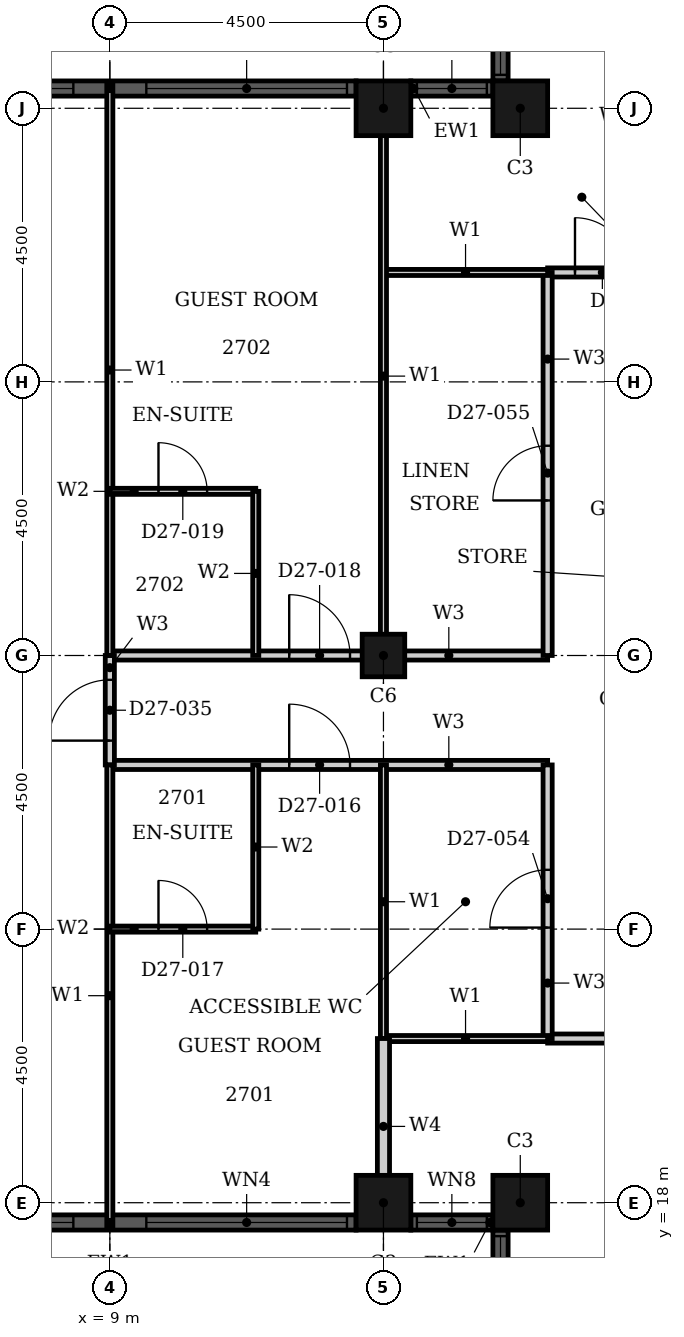
"""IFC4 building model, lengths in metres.
Left out: names, types, materials, properties, quantities, classifications, styles, units other than length and angle.
Written with IfcOpenShell. Run it as: python <this file> out.ifc"""

import sys

from ifc_helpers import new_model, si_unit, direction, frame, frame_2d, origin, origin_2d, place, context, subcontext, project, spatial, rectangle, hollow_rectangle, extrude, element, fill, save


model = new_model("IFC4")
c1 = context("Model", 3, precision=1e-05, world=origin(), true_north=direction((0.0, 1.0)))
c2 = subcontext(c1, "Body", "Model", "MODEL_VIEW")
j1 = project(units=[si_unit("LENGTHUNIT", "METRE"), si_unit("PLANEANGLEUNIT", "RADIAN")], contexts=[c1])
p1 = place(None, origin())
s1 = spatial("IfcSite", under=j1, at=p1, CompositionType="ELEMENT")
p2 = place(p1, origin())
s2 = spatial("IfcBuilding", under=s1, at=p2, CompositionType="ELEMENT")
p3 = place(p2, frame((0.0, 0.0, 111.6)))
s3 = spatial("IfcBuildingStorey", under=s2, at=p3, CompositionType="ELEMENT", Elevation=111.6)
for number, where, z_axis, x_axis in (
    (1, (15.75, 36.0, 0.0), (0.0, 0.0, 1.0), (1.0, 0.0, 0.0)),
    (2, (13.5, 36.0, 0.0), (0.0, 0.0, 1.0), (1.0, 0.0, 0.0)),
    (3, (13.5, 18.0, 0.0), (0.0, 0.0, 1.0), (1.0, 0.0, 0.0)),
    (4, (15.75, 18.0, 0.0), (0.0, 0.0, 1.0), (1.0, 0.0, 0.0)),
):
    element("IfcColumn", number, at=place(p3, frame(where, z_axis=z_axis, x_axis=x_axis)), inside=s3, PredefinedType="COLUMN", context=c2, shape_type="SweptSolid", body=[
        extrude(hollow_rectangle(XDim=0.9, YDim=0.9, WallThickness=0.028, at=origin_2d()), origin(), (0.0, 0.0, 1.0), 3.6),
    ])
p4 = place(p3, frame((13.5, 27.0, 0.0), z_axis=(0.0, 0.0, 1.0), x_axis=(1.0, 0.0, 0.0)))
e5 = element("IfcColumn", 5, at=p4, inside=s3, PredefinedType="COLUMN", context=c2, shape_type="SweptSolid", body=[
    extrude(hollow_rectangle(XDim=0.7, YDim=0.7, WallThickness=0.022, at=origin_2d()), origin(), (0.0, 0.0, 1.0), 3.6),
])
p5 = place(p3, frame((15.425, 37.8, 0.0), z_axis=(0.0, 0.0, 1.0), x_axis=(0.0, -1.0, 0.0)))
e6 = element("IfcWall", 6, at=p5, inside=s3, PredefinedType="SOLIDWALL", context=c2, shape_type="SweptSolid", body=[
    extrude(rectangle(XDim=1.35, YDim=0.25, at=frame_2d((0.675, 0.0))), origin(), (0.0, 0.0, 1.0), 3.6),
])
p6 = place(p5, frame((0.1, 0.0, 0.9)))
e7 = element("IfcOpeningElement", 7, at=p6, cuts=e6, PredefinedType="OPENING", context=c2, shape_type="SweptSolid", body=[
    extrude(rectangle(XDim=1.15, YDim=2.08, at=frame_2d((0.575, 1.04))), frame((0.0, 0.135, 0.0), z_axis=(0.0, -1.0, 0.0), x_axis=(1.0, 0.0, 0.0)), (0.0, 0.0, 1.0), 0.27),
])
p7 = place(p3, frame((15.3, 36.325, 0.0), z_axis=(0.0, 0.0, 1.0), x_axis=(-1.0, 0.0, 0.0)))
e8 = element("IfcWall", 8, at=p7, inside=s3, PredefinedType="SOLIDWALL", context=c2, shape_type="SweptSolid", body=[
    extrude(rectangle(XDim=1.35, YDim=0.25, at=frame_2d((0.675, 0.0))), origin(), (0.0, 0.0, 1.0), 3.6),
])
p8 = place(p7, frame((0.1, 0.0, 0.9)))
e9 = element("IfcOpeningElement", 9, at=p8, cuts=e8, PredefinedType="OPENING", context=c2, shape_type="SweptSolid", body=[
    extrude(rectangle(XDim=1.15, YDim=2.08, at=frame_2d((0.575, 1.04))), frame((0.0, 0.135, 0.0), z_axis=(0.0, -1.0, 0.0), x_axis=(1.0, 0.0, 0.0)), (0.0, 0.0, 1.0), 0.27),
])
p9 = place(p3, frame((13.05, 36.325, 0.0), z_axis=(0.0, 0.0, 1.0), x_axis=(-1.0, 0.0, 0.0)))
e10 = element("IfcWall", 10, at=p9, inside=s3, PredefinedType="SOLIDWALL", context=c2, shape_type="SweptSolid", body=[
    extrude(rectangle(XDim=8.1, YDim=0.25, at=frame_2d((4.05, 0.0))), origin(), (0.0, 0.0, 1.0), 3.6),
])
p10 = place(p9, frame((0.15, 0.0, 0.9)))
e11 = element("IfcOpeningElement", 11, at=p10, cuts=e10, PredefinedType="OPENING", context=c2, shape_type="SweptSolid", body=[
    extrude(rectangle(XDim=3.3, YDim=2.08, at=frame_2d((1.65, 1.04))), frame((0.0, 0.135, 0.0), z_axis=(0.0, -1.0, 0.0), x_axis=(1.0, 0.0, 0.0)), (0.0, 0.0, 1.0), 0.27),
])
p11 = place(p9, frame((4.65, 0.0, 0.9)))
e12 = element("IfcOpeningElement", 12, at=p11, cuts=e10, PredefinedType="OPENING", context=c2, shape_type="SweptSolid", body=[
    extrude(rectangle(XDim=3.3, YDim=2.08, at=frame_2d((1.65, 1.04))), frame((0.0, 0.135, 0.0), z_axis=(0.0, -1.0, 0.0), x_axis=(1.0, 0.0, 0.0)), (0.0, 0.0, 1.0), 0.27),
])
p12 = place(p3, frame((4.95, 17.675, 0.0), z_axis=(0.0, 0.0, 1.0), x_axis=(1.0, 0.0, 0.0)))
e13 = element("IfcWall", 13, at=p12, inside=s3, PredefinedType="SOLIDWALL", context=c2, shape_type="SweptSolid", body=[
    extrude(rectangle(XDim=8.1, YDim=0.25, at=frame_2d((4.05, 0.0))), origin(), (0.0, 0.0, 1.0), 3.6),
])
p13 = place(p12, frame((0.15, 0.0, 0.9)))
e14 = element("IfcOpeningElement", 14, at=p13, cuts=e13, PredefinedType="OPENING", context=c2, shape_type="SweptSolid", body=[
    extrude(rectangle(XDim=3.3, YDim=2.08, at=frame_2d((1.65, 1.04))), frame((0.0, 0.135, 0.0), z_axis=(0.0, -1.0, 0.0), x_axis=(1.0, 0.0, 0.0)), (0.0, 0.0, 1.0), 0.27),
])
p14 = place(p12, frame((4.65, 0.0, 0.9)))
e15 = element("IfcOpeningElement", 15, at=p14, cuts=e13, PredefinedType="OPENING", context=c2, shape_type="SweptSolid", body=[
    extrude(rectangle(XDim=3.3, YDim=2.08, at=frame_2d((1.65, 1.04))), frame((0.0, 0.135, 0.0), z_axis=(0.0, -1.0, 0.0), x_axis=(1.0, 0.0, 0.0)), (0.0, 0.0, 1.0), 0.27),
])
p15 = place(p3, frame((13.95, 17.675, 0.0), z_axis=(0.0, 0.0, 1.0), x_axis=(1.0, 0.0, 0.0)))
e16 = element("IfcWall", 16, at=p15, inside=s3, PredefinedType="SOLIDWALL", context=c2, shape_type="SweptSolid", body=[
    extrude(rectangle(XDim=1.35, YDim=0.25, at=frame_2d((0.675, 0.0))), origin(), (0.0, 0.0, 1.0), 3.6),
])
p16 = place(p15, frame((0.1, 0.0, 0.9)))
e17 = element("IfcOpeningElement", 17, at=p16, cuts=e16, PredefinedType="OPENING", context=c2, shape_type="SweptSolid", body=[
    extrude(rectangle(XDim=1.15, YDim=2.08, at=frame_2d((0.575, 1.04))), frame((0.0, 0.135, 0.0), z_axis=(0.0, -1.0, 0.0), x_axis=(1.0, 0.0, 0.0)), (0.0, 0.0, 1.0), 0.27),
])
p17 = place(p3, frame((15.425, 17.55, 0.0), z_axis=(0.0, 0.0, 1.0), x_axis=(0.0, -1.0, 0.0)))
e18 = element("IfcWall", 18, at=p17, inside=s3, PredefinedType="SOLIDWALL", context=c2, shape_type="SweptSolid", body=[
    extrude(rectangle(XDim=1.35, YDim=0.25, at=frame_2d((0.675, 0.0))), origin(), (0.0, 0.0, 1.0), 3.6),
])
p18 = place(p17, frame((0.1, 0.0, 0.9)))
e19 = element("IfcOpeningElement", 19, at=p18, cuts=e18, PredefinedType="OPENING", context=c2, shape_type="SweptSolid", body=[
    extrude(rectangle(XDim=1.15, YDim=2.08, at=frame_2d((0.575, 1.04))), frame((0.0, 0.135, 0.0), z_axis=(0.0, -1.0, 0.0), x_axis=(1.0, 0.0, 0.0)), (0.0, 0.0, 1.0), 0.27),
])
p19 = place(p3, frame((16.2, 20.7, 0.0), z_axis=(0.0, 0.0, 1.0), x_axis=(1.0, 0.0, 0.0)))
e20 = element("IfcWall", 20, at=p19, inside=s3, PredefinedType="PARTITIONING", context=c2, shape_type="SweptSolid", body=[
    extrude(rectangle(XDim=13.5, YDim=0.15, at=frame_2d((6.75, 0.0))), origin(), (0.0, 0.0, 1.0), 3.3),
])
p20 = place(p19, frame((4.75, 0.0, 0.0)))
e21 = element("IfcOpeningElement", 21, at=p20, cuts=e20, PredefinedType="OPENING", context=c2, shape_type="SweptSolid", body=[
    extrude(rectangle(XDim=1.0, YDim=2.1, at=frame_2d((0.5, 1.05))), frame((0.0, 0.085, 0.0), z_axis=(0.0, -1.0, 0.0), x_axis=(1.0, 0.0, 0.0)), (0.0, 0.0, 1.0), 0.17),
])
p21 = place(p19, frame((9.45, 0.0, 0.0)))
e22 = element("IfcOpeningElement", 22, at=p21, cuts=e20, PredefinedType="OPENING", context=c2, shape_type="SweptSolid", body=[
    extrude(rectangle(XDim=0.9, YDim=2.1, at=frame_2d((0.45, 1.05))), frame((0.0, 0.085, 0.0), z_axis=(0.0, -1.0, 0.0), x_axis=(1.0, 0.0, 0.0)), (0.0, 0.0, 1.0), 0.17),
])
p22 = place(p3, frame((9.0, 25.2, 0.0), z_axis=(0.0, 0.0, 1.0), x_axis=(1.0, 0.0, 0.0)))
e23 = element("IfcWall", 23, at=p22, inside=s3, PredefinedType="PARTITIONING", context=c2, shape_type="SweptSolid", body=[
    extrude(rectangle(XDim=7.2, YDim=0.15, at=frame_2d((3.6, 0.0))), origin(), (0.0, 0.0, 1.0), 3.3),
])
p23 = place(p22, frame((2.95, 0.0, 0.0)))
e24 = element("IfcOpeningElement", 24, at=p23, cuts=e23, PredefinedType="OPENING", context=c2, shape_type="SweptSolid", body=[
    extrude(rectangle(XDim=1.0, YDim=2.1, at=frame_2d((0.5, 1.05))), frame((0.0, 0.085, 0.0), z_axis=(0.0, -1.0, 0.0), x_axis=(1.0, 0.0, 0.0)), (0.0, 0.0, 1.0), 0.17),
])
p24 = place(p3, frame((9.0, 27.0, 0.0), z_axis=(0.0, 0.0, 1.0), x_axis=(1.0, 0.0, 0.0)))
e25 = element("IfcWall", 25, at=p24, inside=s3, PredefinedType="PARTITIONING", context=c2, shape_type="SweptSolid", body=[
    extrude(rectangle(XDim=7.2, YDim=0.15, at=frame_2d((3.6, 0.0))), origin(), (0.0, 0.0, 1.0), 2.58),
])
p25 = place(p24, frame((2.95, 0.0, 0.0)))
e26 = element("IfcOpeningElement", 26, at=p25, cuts=e25, PredefinedType="OPENING", context=c2, shape_type="SweptSolid", body=[
    extrude(rectangle(XDim=1.0, YDim=2.1, at=frame_2d((0.5, 1.05))), frame((0.0, 0.085, 0.0), z_axis=(0.0, -1.0, 0.0), x_axis=(1.0, 0.0, 0.0)), (0.0, 0.0, 1.0), 0.17),
])
p26 = place(p3, frame((16.2, 33.3, 0.0), z_axis=(0.0, 0.0, 1.0), x_axis=(1.0, 0.0, 0.0)))
e27 = element("IfcWall", 27, at=p26, inside=s3, PredefinedType="PARTITIONING", context=c2, shape_type="SweptSolid", body=[
    extrude(rectangle(XDim=15.3, YDim=0.15, at=frame_2d((7.65, 0.0))), origin(), (0.0, 0.0, 1.0), 3.3),
])
p27 = place(p26, frame((4.75, 0.0, 0.0)))
e28 = element("IfcOpeningElement", 28, at=p27, cuts=e27, PredefinedType="OPENING", context=c2, shape_type="SweptSolid", body=[
    extrude(rectangle(XDim=1.0, YDim=2.1, at=frame_2d((0.5, 1.05))), frame((0.0, 0.085, 0.0), z_axis=(0.0, -1.0, 0.0), x_axis=(1.0, 0.0, 0.0)), (0.0, 0.0, 1.0), 0.17),
])
p28 = place(p26, frame((0.45, 0.0, 0.0)))
e29 = element("IfcOpeningElement", 29, at=p28, cuts=e27, PredefinedType="OPENING", context=c2, shape_type="SweptSolid", body=[
    extrude(rectangle(XDim=0.9, YDim=2.1, at=frame_2d((0.45, 1.05))), frame((0.0, 0.085, 0.0), z_axis=(0.0, -1.0, 0.0), x_axis=(1.0, 0.0, 0.0)), (0.0, 0.0, 1.0), 0.17),
])
p29 = place(p26, frame((10.35, 0.0, 0.0)))
e30 = element("IfcOpeningElement", 30, at=p29, cuts=e27, PredefinedType="OPENING", context=c2, shape_type="SweptSolid", body=[
    extrude(rectangle(XDim=0.9, YDim=2.1, at=frame_2d((0.45, 1.05))), frame((0.0, 0.085, 0.0), z_axis=(0.0, -1.0, 0.0), x_axis=(1.0, 0.0, 0.0)), (0.0, 0.0, 1.0), 0.17),
])
p30 = place(p3, frame((16.2, 27.0, 0.0), z_axis=(0.0, 0.0, 1.0), x_axis=(0.0, 1.0, 0.0)))
e31 = element("IfcWall", 31, at=p30, inside=s3, PredefinedType="PARTITIONING", context=c2, shape_type="SweptSolid", body=[
    extrude(rectangle(XDim=6.3, YDim=0.15, at=frame_2d((3.15, 0.0))), origin(), (0.0, 0.0, 1.0), 3.3),
])
p31 = place(p30, frame((2.55, 0.0, 0.0)))
e32 = element("IfcOpeningElement", 32, at=p31, cuts=e31, PredefinedType="OPENING", context=c2, shape_type="SweptSolid", body=[
    extrude(rectangle(XDim=0.9, YDim=2.1, at=frame_2d((0.45, 1.05))), frame((0.0, 0.085, 0.0), z_axis=(0.0, -1.0, 0.0), x_axis=(1.0, 0.0, 0.0)), (0.0, 0.0, 1.0), 0.17),
])
p32 = place(p3, frame((16.2, 20.7, 0.0), z_axis=(0.0, 0.0, 1.0), x_axis=(0.0, 1.0, 0.0)))
e33 = element("IfcWall", 33, at=p32, inside=s3, PredefinedType="PARTITIONING", context=c2, shape_type="SweptSolid", body=[
    extrude(rectangle(XDim=4.5, YDim=0.15, at=frame_2d((2.25, 0.0))), origin(), (0.0, 0.0, 1.0), 3.3),
])
p33 = place(p32, frame((1.825, 0.0, 0.0)))
e34 = element("IfcOpeningElement", 34, at=p33, cuts=e33, PredefinedType="OPENING", context=c2, shape_type="SweptSolid", body=[
    extrude(rectangle(XDim=0.95, YDim=2.1, at=frame_2d((0.475, 1.05))), frame((0.0, 0.085, 0.0), z_axis=(0.0, -1.0, 0.0), x_axis=(1.0, 0.0, 0.0)), (0.0, 0.0, 1.0), 0.17),
])
p34 = place(p3, frame((9.0, 25.2, 0.0), z_axis=(0.0, 0.0, 1.0), x_axis=(0.0, 1.0, 0.0)))
e35 = element("IfcWall", 35, at=p34, inside=s3, PredefinedType="PARTITIONING", context=c2, shape_type="SweptSolid", body=[
    extrude(rectangle(XDim=1.8, YDim=0.15, at=frame_2d((0.9, 0.0))), origin(), (0.0, 0.0, 1.0), 3.3),
])
p35 = place(p34, frame((0.4, 0.0, 0.0)))
e36 = element("IfcOpeningElement", 36, at=p35, cuts=e35, PredefinedType="OPENING", context=c2, shape_type="SweptSolid", body=[
    extrude(rectangle(XDim=1.0, YDim=2.1, at=frame_2d((0.5, 1.05))), frame((0.0, 0.085, 0.0), z_axis=(0.0, -1.0, 0.0), x_axis=(1.0, 0.0, 0.0)), (0.0, 0.0, 1.0), 0.17),
])
for number, where, z_axis, x_axis in (
    (37, (13.5, 20.7, 0.0), (0.0, 0.0, 1.0), (1.0, 0.0, 0.0)),
    (38, (13.5, 33.3, 0.0), (0.0, 0.0, 1.0), (1.0, 0.0, 0.0)),
):
    element("IfcWall", number, at=place(p3, frame(where, z_axis=z_axis, x_axis=x_axis)), inside=s3, PredefinedType="PARTITIONING", context=c2, shape_type="SweptSolid", body=[
        extrude(rectangle(XDim=2.7, YDim=0.1, at=frame_2d((1.35, 0.0))), origin(), (0.0, 0.0, 1.0), 3.3),
    ])
p36 = place(p3, frame((13.5, 27.0, 0.0), z_axis=(0.0, 0.0, 1.0), x_axis=(0.0, 1.0, 0.0)))
e39 = element("IfcWall", 39, at=p36, inside=s3, PredefinedType="PARTITIONING", context=c2, shape_type="SweptSolid", body=[
    extrude(rectangle(XDim=9.19, YDim=0.1, at=frame_2d((4.595, 0.0))), origin(), (0.0, 0.0, 1.0), 2.38),
])
p37 = place(p3, frame((13.5, 20.7, 0.0), z_axis=(0.0, 0.0, 1.0), x_axis=(0.0, 1.0, 0.0)))
e40 = element("IfcWall", 40, at=p37, inside=s3, PredefinedType="PARTITIONING", context=c2, shape_type="SweptSolid", body=[
    extrude(rectangle(XDim=4.5, YDim=0.1, at=frame_2d((2.25, 0.0))), origin(), (0.0, 0.0, 1.0), 2.38),
])
p38 = place(p3, frame((9.0, 27.0, 0.0), z_axis=(0.0, 0.0, 1.0), x_axis=(0.0, 1.0, 0.0)))
e41 = element("IfcWall", 41, at=p38, inside=s3, PredefinedType="PARTITIONING", context=c2, shape_type="SweptSolid", body=[
    extrude(rectangle(XDim=9.39, YDim=0.1, at=frame_2d((4.695, 0.0))), origin(), (0.0, 0.0, 1.0), 3.3),
])
p39 = place(p3, frame((9.0, 17.61, 0.0), z_axis=(0.0, 0.0, 1.0), x_axis=(0.0, 1.0, 0.0)))
e42 = element("IfcWall", 42, at=p39, inside=s3, PredefinedType="PARTITIONING", context=c2, shape_type="SweptSolid", body=[
    extrude(rectangle(XDim=7.59, YDim=0.1, at=frame_2d((3.795, 0.0))), origin(), (0.0, 0.0, 1.0), 3.3),
])
p40 = place(p3, frame((13.5, 17.81, 0.0), z_axis=(0.0, 0.0, 1.0), x_axis=(0.0, 1.0, 0.0)))
e43 = element("IfcWall", 43, at=p40, inside=s3, PredefinedType="PARTITIONING", context=c2, shape_type="SweptSolid", body=[
    extrude(rectangle(XDim=2.89, YDim=0.2, at=frame_2d((1.445, 0.0))), origin(), (0.0, 0.0, 1.0), 2.38),
])
p41 = place(p3, frame((9.0, 22.5, 0.0), z_axis=(0.0, 0.0, 1.0), x_axis=(1.0, 0.0, 0.0)))
e44 = element("IfcWall", 44, at=p41, inside=s3, PredefinedType="PARTITIONING", context=c2, shape_type="SweptSolid", body=[
    extrude(rectangle(XDim=2.4, YDim=0.1, at=frame_2d((1.2, 0.0))), origin(), (0.0, 0.0, 1.0), 2.58),
])
p42 = place(p41, frame((0.8, 0.0, 0.0)))
e45 = element("IfcOpeningElement", 45, at=p42, cuts=e44, PredefinedType="OPENING", context=c2, shape_type="SweptSolid", body=[
    extrude(rectangle(XDim=0.8, YDim=2.1, at=frame_2d((0.4, 1.05))), frame((0.0, 0.06, 0.0), z_axis=(0.0, -1.0, 0.0), x_axis=(1.0, 0.0, 0.0)), (0.0, 0.0, 1.0), 0.12),
])
p43 = place(p3, frame((9.0, 29.7, 0.0), z_axis=(0.0, 0.0, 1.0), x_axis=(1.0, 0.0, 0.0)))
e46 = element("IfcWall", 46, at=p43, inside=s3, PredefinedType="PARTITIONING", context=c2, shape_type="SweptSolid", body=[
    extrude(rectangle(XDim=2.4, YDim=0.1, at=frame_2d((1.2, 0.0))), origin(), (0.0, 0.0, 1.0), 3.3),
])
p44 = place(p43, frame((0.8, 0.0, 0.0)))
e47 = element("IfcOpeningElement", 47, at=p44, cuts=e46, PredefinedType="OPENING", context=c2, shape_type="SweptSolid", body=[
    extrude(rectangle(XDim=0.8, YDim=2.1, at=frame_2d((0.4, 1.05))), frame((0.0, 0.06, 0.0), z_axis=(0.0, -1.0, 0.0), x_axis=(1.0, 0.0, 0.0)), (0.0, 0.0, 1.0), 0.12),
])
for number, where, z_axis, x_axis in (
    (48, (11.4, 27.0, 0.0), (0.0, 0.0, 1.0), (0.0, 1.0, 0.0)),
    (49, (11.4, 22.5, 0.0), (0.0, 0.0, 1.0), (0.0, 1.0, 0.0)),
):
    element("IfcWall", number, at=place(p3, frame(where, z_axis=z_axis, x_axis=x_axis)), inside=s3, PredefinedType="PARTITIONING", context=c2, shape_type="SweptSolid", body=[
        extrude(rectangle(XDim=2.7, YDim=0.1, at=frame_2d((1.35, 0.0))), origin(), (0.0, 0.0, 1.0), 3.3),
    ])
p45 = place(p6, origin())
e50 = element("IfcWindow", 50, at=p45, inside=s3, PartitioningType="SINGLE_PANEL", PredefinedType="WINDOW", context=c2, shape_type="SweptSolid", body=[
    extrude(rectangle(XDim=1.15, YDim=2.08, at=frame_2d((0.575, 1.04))), frame((0.0, 0.03, 0.0), z_axis=(0.0, -1.0, 0.0), x_axis=(1.0, 0.0, 0.0)), (0.0, 0.0, 1.0), 0.06),
])
fill(e7, e50)
p46 = place(p8, origin())
e51 = element("IfcWindow", 51, at=p46, inside=s3, PartitioningType="SINGLE_PANEL", PredefinedType="WINDOW", context=c2, shape_type="SweptSolid", body=[
    extrude(rectangle(XDim=1.15, YDim=2.08, at=frame_2d((0.575, 1.04))), frame((0.0, 0.03, 0.0), z_axis=(0.0, -1.0, 0.0), x_axis=(1.0, 0.0, 0.0)), (0.0, 0.0, 1.0), 0.06),
])
fill(e9, e51)
p47 = place(p10, origin())
e52 = element("IfcWindow", 52, at=p47, inside=s3, PartitioningType="SINGLE_PANEL", PredefinedType="WINDOW", context=c2, shape_type="SweptSolid", body=[
    extrude(rectangle(XDim=3.3, YDim=2.08, at=frame_2d((1.65, 1.04))), frame((0.0, 0.03, 0.0), z_axis=(0.0, -1.0, 0.0), x_axis=(1.0, 0.0, 0.0)), (0.0, 0.0, 1.0), 0.06),
])
fill(e11, e52)
p48 = place(p11, origin())
e53 = element("IfcWindow", 53, at=p48, inside=s3, PartitioningType="SINGLE_PANEL", PredefinedType="WINDOW", context=c2, shape_type="SweptSolid", body=[
    extrude(rectangle(XDim=3.3, YDim=2.08, at=frame_2d((1.65, 1.04))), frame((0.0, 0.03, 0.0), z_axis=(0.0, -1.0, 0.0), x_axis=(1.0, 0.0, 0.0)), (0.0, 0.0, 1.0), 0.06),
])
fill(e12, e53)
p49 = place(p13, origin())
e54 = element("IfcWindow", 54, at=p49, inside=s3, PartitioningType="SINGLE_PANEL", PredefinedType="WINDOW", context=c2, shape_type="SweptSolid", body=[
    extrude(rectangle(XDim=3.3, YDim=2.08, at=frame_2d((1.65, 1.04))), frame((0.0, 0.03, 0.0), z_axis=(0.0, -1.0, 0.0), x_axis=(1.0, 0.0, 0.0)), (0.0, 0.0, 1.0), 0.06),
])
fill(e14, e54)
p50 = place(p14, origin())
e55 = element("IfcWindow", 55, at=p50, inside=s3, PartitioningType="SINGLE_PANEL", PredefinedType="WINDOW", context=c2, shape_type="SweptSolid", body=[
    extrude(rectangle(XDim=3.3, YDim=2.08, at=frame_2d((1.65, 1.04))), frame((0.0, 0.03, 0.0), z_axis=(0.0, -1.0, 0.0), x_axis=(1.0, 0.0, 0.0)), (0.0, 0.0, 1.0), 0.06),
])
fill(e15, e55)
p51 = place(p16, origin())
e56 = element("IfcWindow", 56, at=p51, inside=s3, PartitioningType="SINGLE_PANEL", PredefinedType="WINDOW", context=c2, shape_type="SweptSolid", body=[
    extrude(rectangle(XDim=1.15, YDim=2.08, at=frame_2d((0.575, 1.04))), frame((0.0, 0.03, 0.0), z_axis=(0.0, -1.0, 0.0), x_axis=(1.0, 0.0, 0.0)), (0.0, 0.0, 1.0), 0.06),
])
fill(e17, e56)
p52 = place(p18, origin())
e57 = element("IfcWindow", 57, at=p52, inside=s3, PartitioningType="SINGLE_PANEL", PredefinedType="WINDOW", context=c2, shape_type="SweptSolid", body=[
    extrude(rectangle(XDim=1.15, YDim=2.08, at=frame_2d((0.575, 1.04))), frame((0.0, 0.03, 0.0), z_axis=(0.0, -1.0, 0.0), x_axis=(1.0, 0.0, 0.0)), (0.0, 0.0, 1.0), 0.06),
])
fill(e19, e57)
p53 = place(p23, origin())
e58 = element("IfcDoor", 58, at=p53, inside=s3, OperationType="SINGLE_SWING_RIGHT", PredefinedType="DOOR", context=c2, shape_type="SweptSolid", body=[
    extrude(rectangle(XDim=1.0, YDim=2.1, at=frame_2d((0.5, 1.05))), frame((0.0, 0.025, 0.0), z_axis=(0.0, -1.0, 0.0), x_axis=(1.0, 0.0, 0.0)), (0.0, 0.0, 1.0), 0.05),
])
fill(e24, e58)
p54 = place(p42, origin())
e59 = element("IfcDoor", 59, at=p54, inside=s3, OperationType="SINGLE_SWING_RIGHT", PredefinedType="DOOR", context=c2, shape_type="SweptSolid", body=[
    extrude(rectangle(XDim=0.8, YDim=2.1, at=frame_2d((0.4, 1.05))), frame((0.0, 0.025, 0.0), z_axis=(0.0, -1.0, 0.0), x_axis=(1.0, 0.0, 0.0)), (0.0, 0.0, 1.0), 0.05),
])
fill(e45, e59)
p55 = place(p25, origin())
e60 = element("IfcDoor", 60, at=p55, inside=s3, OperationType="SINGLE_SWING_RIGHT", PredefinedType="DOOR", context=c2, shape_type="SweptSolid", body=[
    extrude(rectangle(XDim=1.0, YDim=2.1, at=frame_2d((0.5, 1.05))), frame((0.0, 0.025, 0.0), z_axis=(0.0, -1.0, 0.0), x_axis=(1.0, 0.0, 0.0)), (0.0, 0.0, 1.0), 0.05),
])
fill(e26, e60)
p56 = place(p44, origin())
e61 = element("IfcDoor", 61, at=p56, inside=s3, OperationType="SINGLE_SWING_LEFT", PredefinedType="DOOR", context=c2, shape_type="SweptSolid", body=[
    extrude(rectangle(XDim=0.8, YDim=2.1, at=frame_2d((0.4, 1.05))), frame((0.0, 0.025, 0.0), z_axis=(0.0, -1.0, 0.0), x_axis=(1.0, 0.0, 0.0)), (0.0, 0.0, 1.0), 0.05),
])
fill(e47, e61)
p57 = place(p35, origin())
e62 = element("IfcDoor", 62, at=p57, inside=s3, OperationType="SINGLE_SWING_RIGHT", PredefinedType="DOOR", context=c2, shape_type="SweptSolid", body=[
    extrude(rectangle(XDim=1.0, YDim=2.1, at=frame_2d((0.5, 1.05))), frame((0.0, 0.025, 0.0), z_axis=(0.0, -1.0, 0.0), x_axis=(1.0, 0.0, 0.0)), (0.0, 0.0, 1.0), 0.05),
])
fill(e36, e62)
p58 = place(p28, origin())
e63 = element("IfcDoor", 63, at=p58, inside=s3, OperationType="SINGLE_SWING_LEFT", PredefinedType="DOOR", context=c2, shape_type="SweptSolid", body=[
    extrude(rectangle(XDim=0.9, YDim=2.1, at=frame_2d((0.45, 1.05))), frame((0.0, 0.025, 0.0), z_axis=(0.0, -1.0, 0.0), x_axis=(1.0, 0.0, 0.0)), (0.0, 0.0, 1.0), 0.05),
])
fill(e29, e63)
p59 = place(p33, origin())
e64 = element("IfcDoor", 64, at=p59, inside=s3, OperationType="SINGLE_SWING_RIGHT", PredefinedType="DOOR", context=c2, shape_type="SweptSolid", body=[
    extrude(rectangle(XDim=0.95, YDim=2.1, at=frame_2d((0.475, 1.05))), frame((0.0, 0.025, 0.0), z_axis=(0.0, -1.0, 0.0), x_axis=(1.0, 0.0, 0.0)), (0.0, 0.0, 1.0), 0.05),
])
fill(e34, e64)
p60 = place(p31, origin())
e65 = element("IfcDoor", 65, at=p60, inside=s3, OperationType="SINGLE_SWING_LEFT", PredefinedType="DOOR", context=c2, shape_type="SweptSolid", body=[
    extrude(rectangle(XDim=0.9, YDim=2.1, at=frame_2d((0.45, 1.05))), frame((0.0, 0.025, 0.0), z_axis=(0.0, -1.0, 0.0), x_axis=(1.0, 0.0, 0.0)), (0.0, 0.0, 1.0), 0.05),
])
fill(e32, e65)
save(model, sys.argv[1])
